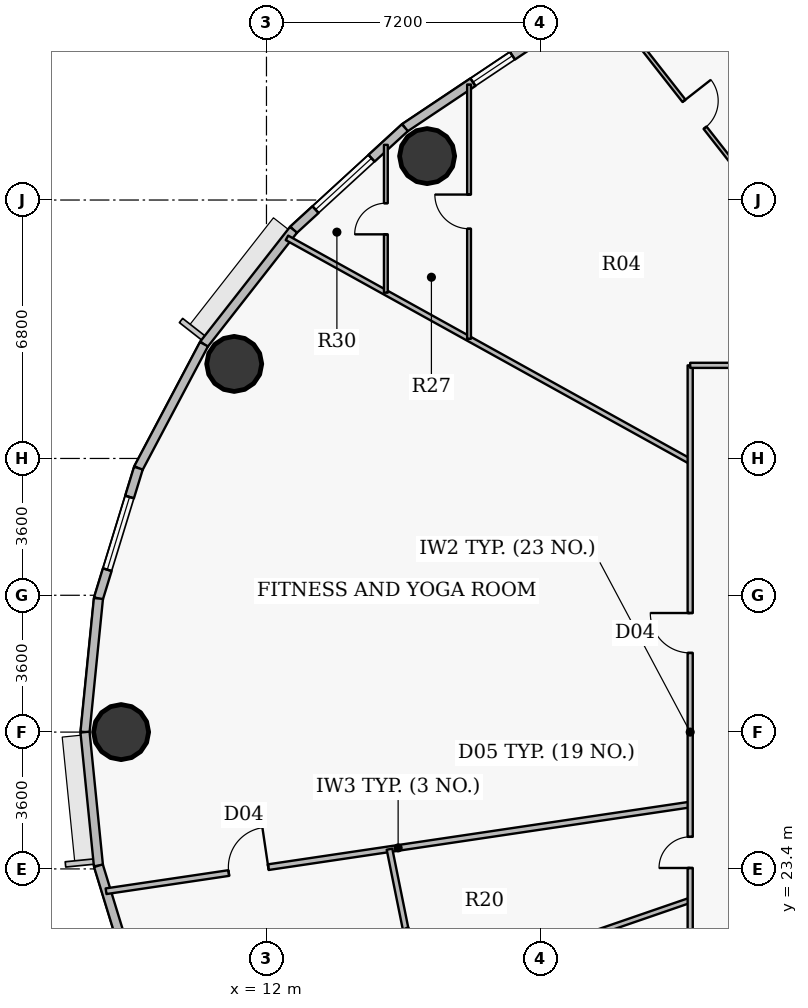
"""IFC4 building model, lengths in metres.
Left out: names, types, materials, properties, quantities, classifications, styles, units other than length and angle.
Written with IfcOpenShell. Run it as: python <this file> out.ifc"""

import sys

from ifc_helpers import new_model, si_unit, direction, frame, frame_2d, origin, origin_2d, place, context, subcontext, project, spatial, rectangle, hollow_circle, extrude, source, transform, mapped, element, fill, save


model = new_model("IFC4")
c1 = context("Model", 3, precision=1e-05, world=origin(), true_north=direction((0.0, 1.0)))
c2 = subcontext(c1, "Body", "Model", "MODEL_VIEW")
j1 = project(units=[si_unit("LENGTHUNIT", "METRE"), si_unit("PLANEANGLEUNIT", "RADIAN")], contexts=[c1])
p1 = place(None, origin())
s1 = spatial("IfcSite", under=j1, at=p1, CompositionType="ELEMENT")
p2 = place(p1, origin())
s2 = spatial("IfcBuilding", under=s1, at=p2, CompositionType="ELEMENT")
p3 = place(p2, frame((0.0, 0.0, 142.2)))
s3 = spatial("IfcBuildingStorey", under=s2, at=p3, CompositionType="ELEMENT", Elevation=142.2)
for number, where, z_axis, x_axis in (
    (1, (16.227, 42.156, 0.0), (0.0, 0.0, 1.0), (1.0, 0.0, 0.0)),
    (2, (11.151, 36.688, 0.0), (0.0, 0.0, 1.0), (1.0, 0.0, 0.0)),
    (3, (8.175, 27.0, 0.0), (0.0, 0.0, 1.0), (1.0, 0.0, 0.0)),
):
    element("IfcColumn", number, at=place(p3, frame(where, z_axis=z_axis, x_axis=x_axis)), inside=s3, PredefinedType="COLUMN", context=c2, shape_type="SweptSolid", body=[
        extrude(hollow_circle(Radius=0.725, WallThickness=0.042, at=origin_2d()), origin(), (0.0, 0.0, 1.0), 3.75),
    ])
p4 = place(p3, frame((15.642, 42.903, 0.0), z_axis=(0.0, 0.0, 1.0), x_axis=(0.831221811447, 0.555940914284, 0.0)))
e4 = element("IfcWall", 4, at=p4, inside=s3, PredefinedType="SOLIDWALL", context=c2, shape_type="SweptSolid", body=[
    extrude(rectangle(XDim=4.13, YDim=0.24, at=frame_2d((2.065, 0.0))), origin(), (0.0, 0.0, 1.0), 3.45),
])
p5 = place(p4, frame((2.156, 0.0, 0.9)))
e5 = element("IfcOpeningElement", 5, at=p5, cuts=e4, PredefinedType="OPENING", context=c2, shape_type="SweptSolid", body=[
    extrude(rectangle(XDim=1.25, YDim=1.65, at=origin_2d()), frame((0.625, 0.13, 0.825), z_axis=(0.0, -1.0, 0.0), x_axis=(1.0, 0.0, 0.0)), (0.0, 0.0, 1.0), 0.26),
])
p6 = place(p3, frame((12.711, 40.217, 0.0), z_axis=(0.0, 0.0, 1.0), x_axis=(0.737113356241, 0.675769117414, 0.0)))
e6 = element("IfcWall", 6, at=p6, inside=s3, PredefinedType="SOLIDWALL", context=c2, shape_type="SweptSolid", body=[
    extrude(rectangle(XDim=3.976, YDim=0.24, at=frame_2d((1.988, 0.0))), origin(), (0.0, 0.0, 1.0), 3.45),
])
p7 = place(p6, frame((0.787, 0.0, 0.9)))
e7 = element("IfcOpeningElement", 7, at=p7, cuts=e6, PredefinedType="OPENING", context=c2, shape_type="SweptSolid", body=[
    extrude(rectangle(XDim=2.0, YDim=1.75, at=origin_2d()), frame((1.0, 0.13, 0.875), z_axis=(0.0, -1.0, 0.0), x_axis=(1.0, 0.0, 0.0)), (0.0, 0.0, 1.0), 0.26),
])
p8 = place(p3, frame((10.355, 37.206, 0.0), z_axis=(0.0, 0.0, 1.0), x_axis=(0.616272103517, 0.787533297345, 0.0)))
e8 = element("IfcWall", 8, at=p8, inside=s3, PredefinedType="SOLIDWALL", context=c2, shape_type="SweptSolid", body=[
    extrude(rectangle(XDim=3.823, YDim=0.24, at=frame_2d((1.912, 0.0))), origin(), (0.0, 0.0, 1.0), 3.45),
])
p9 = place(p3, frame((8.63, 33.945, 0.0), z_axis=(0.0, 0.0, 1.0), x_axis=(0.467614004126, 0.883932770716, 0.0)))
e9 = element("IfcWall", 9, at=p9, inside=s3, PredefinedType="SOLIDWALL", context=c2, shape_type="SweptSolid", body=[
    extrude(rectangle(XDim=3.689, YDim=0.24, at=frame_2d((1.844, 0.0))), origin(), (0.0, 0.0, 1.0), 3.45),
])
p10 = place(p3, frame((7.578, 30.515, 0.0), z_axis=(0.0, 0.0, 1.0), x_axis=(0.293124431344, 0.956074300329, 0.0)))
e10 = element("IfcWall", 10, at=p10, inside=s3, PredefinedType="SOLIDWALL", context=c2, shape_type="SweptSolid", body=[
    extrude(rectangle(XDim=3.587, YDim=0.24, at=frame_2d((1.793, 0.0))), origin(), (0.0, 0.0, 1.0), 3.45),
])
p11 = place(p10, frame((0.794, 0.0, 0.9)))
e11 = element("IfcOpeningElement", 11, at=p11, cuts=e10, PredefinedType="OPENING", context=c2, shape_type="SweptSolid", body=[
    extrude(rectangle(XDim=2.0, YDim=1.75, at=origin_2d()), frame((1.0, 0.13, 0.875), z_axis=(0.0, -1.0, 0.0), x_axis=(1.0, 0.0, 0.0)), (0.0, 0.0, 1.0), 0.26),
])
for number, where, z_axis, x_axis in (
    (12, (7.225, 27.0, 0.0), (0.0, 0.0, 1.0), (0.1, 0.995, 0.0)),
    (13, (7.578, 23.485, 0.0), (0.0, 0.0, 1.0), (-0.1, 0.995, 0.0)),
):
    element("IfcWall", number, at=place(p3, frame(where, z_axis=z_axis, x_axis=x_axis)), inside=s3, PredefinedType="SOLIDWALL", context=c2, shape_type="SweptSolid", body=[
        extrude(rectangle(XDim=3.533, YDim=0.24, at=frame_2d((1.767, 0.0))), origin(), (0.0, 0.0, 1.0), 3.45),
    ])
p12 = place(p3, frame((8.63, 20.055, 0.0), z_axis=(0.0, 0.0, 1.0), x_axis=(-0.293124431344, 0.956074300329, 0.0)))
e14 = element("IfcWall", 14, at=p12, inside=s3, PredefinedType="SOLIDWALL", context=c2, shape_type="SweptSolid", body=[
    extrude(rectangle(XDim=3.587, YDim=0.24, at=frame_2d((1.793, 0.0))), origin(), (0.0, 0.0, 1.0), 3.45),
])
p13 = place(p3, frame((7.779, 22.812, 0.0), z_axis=(0.0, 0.0, 1.0), x_axis=(0.989169524168, 0.146777561148, 0.0)))
e15 = element("IfcWall", 15, at=p13, inside=s3, PredefinedType="PARTITIONING", context=c2, shape_type="SweptSolid", body=[
    extrude(rectangle(XDim=15.539, YDim=0.15, at=frame_2d((7.77, 0.0))), origin(), (0.0, 0.0, 1.0), 2.885),
])
p14 = place(p13, frame((3.265, 0.0, 0.0)))
e16 = element("IfcOpeningElement", 16, at=p14, cuts=e15, PredefinedType="OPENING", context=c2, shape_type="SweptSolid", body=[
    extrude(rectangle(XDim=1.05, YDim=2.15, at=origin_2d()), frame((0.525, 0.085, 1.075), z_axis=(0.0, -1.0, 0.0), x_axis=(1.0, 0.0, 0.0)), (0.0, 0.0, 1.0), 0.17),
])
p15 = place(p3, frame((9.735, 17.956, 0.0), z_axis=(0.0, 0.0, 1.0), x_axis=(0.945515704768, 0.325576491836, 0.0)))
e17 = element("IfcWall", 17, at=p15, inside=s3, PredefinedType="PARTITIONING", context=c2, shape_type="SweptSolid", body=[
    extrude(rectangle(XDim=14.188, YDim=0.135, at=frame_2d((7.094, 0.0))), origin(), (0.0, 0.0, 1.0), 2.885),
])
p16 = place(p3, frame((12.539, 40.005, 0.0), z_axis=(0.0, 0.0, 1.0), x_axis=(0.874619146564, -0.484810631549, 0.0)))
e18 = element("IfcWall", 18, at=p16, inside=s3, PredefinedType="PARTITIONING", context=c2, shape_type="SweptSolid", body=[
    extrude(rectangle(XDim=12.132, YDim=0.135, at=frame_2d((6.066, 0.0))), origin(), (0.0, 0.0, 1.0), 2.885),
])
p17 = place(p3, frame((15.142, 38.562, 0.0), z_axis=(0.0, 0.0, 1.0), x_axis=(0.0, 1.0, 0.0)))
e19 = element("IfcWall", 19, at=p17, inside=s3, PredefinedType="PARTITIONING", context=c2, shape_type="SweptSolid", body=[
    extrude(rectangle(XDim=3.89, YDim=0.1, at=frame_2d((1.945, 0.0))), origin(), (0.0, 0.0, 1.0), 2.885),
])
p18 = place(p17, frame((1.535, 0.0, 0.0)))
e20 = element("IfcOpeningElement", 20, at=p18, cuts=e19, PredefinedType="OPENING", context=c2, shape_type="SweptSolid", body=[
    extrude(rectangle(XDim=0.82, YDim=2.1, at=origin_2d()), frame((0.41, 0.06, 1.05), z_axis=(0.0, -1.0, 0.0), x_axis=(1.0, 0.0, 0.0)), (0.0, 0.0, 1.0), 0.12),
])
p19 = place(p3, frame((15.237, 23.919, 0.0), z_axis=(0.0, 0.0, 1.0), x_axis=(0.198269330309, -0.98014757698, 0.0)))
e21 = element("IfcWall", 21, at=p19, inside=s3, PredefinedType="PARTITIONING", context=c2, shape_type="SweptSolid", body=[
    extrude(rectangle(XDim=2.136, YDim=0.15, at=frame_2d((1.068, 0.0))), origin(), (0.0, 0.0, 1.0), 2.885),
])
p20 = place(p3, frame((15.661, 21.825, 0.0), z_axis=(0.0, 0.0, 1.0), x_axis=(0.54543603077, -0.838152454114, 0.0)))
e22 = element("IfcWall", 22, at=p20, inside=s3, PredefinedType="PARTITIONING", context=c2, shape_type="SweptSolid", body=[
    extrude(rectangle(XDim=1.782, YDim=0.15, at=frame_2d((0.891, 0.0))), origin(), (0.0, 0.0, 1.0), 2.885),
])
p21 = place(p3, frame((17.331, 37.348, 0.0), z_axis=(0.0, 0.0, 1.0), x_axis=(0.0, 1.0, 0.0)))
e23 = element("IfcWall", 23, at=p21, inside=s3, PredefinedType="PARTITIONING", context=c2, shape_type="SweptSolid", body=[
    extrude(rectangle(XDim=6.691, YDim=0.1, at=frame_2d((3.345, 0.0))), origin(), (0.0, 0.0, 1.0), 2.885),
])
p22 = place(p21, frame((2.895, 0.0, 0.0)))
e24 = element("IfcOpeningElement", 24, at=p22, cuts=e23, PredefinedType="OPENING", context=c2, shape_type="SweptSolid", body=[
    extrude(rectangle(XDim=0.9, YDim=2.1, at=origin_2d()), frame((0.45, 0.06, 1.05), z_axis=(0.0, -1.0, 0.0), x_axis=(1.0, 0.0, 0.0)), (0.0, 0.0, 1.0), 0.12),
])
p23 = place(p3, frame((21.01, 46.133, 0.0), z_axis=(0.0, 0.0, 1.0), x_axis=(0.616738538538, -0.787168072956, 0.0)))
e25 = element("IfcWall", 25, at=p23, inside=s3, PredefinedType="PARTITIONING", context=c2, shape_type="SweptSolid", body=[
    extrude(rectangle(XDim=7.312, YDim=0.1, at=frame_2d((3.656, 0.0))), origin(), (0.0, 0.0, 1.0), 2.885),
])
p24 = place(p23, frame((3.206, 0.0, 0.0)))
e26 = element("IfcOpeningElement", 26, at=p24, cuts=e25, PredefinedType="OPENING", context=c2, shape_type="SweptSolid", body=[
    extrude(rectangle(XDim=0.9, YDim=2.1, at=origin_2d()), frame((0.45, 0.06, 1.05), z_axis=(0.0, -1.0, 0.0), x_axis=(1.0, 0.0, 0.0)), (0.0, 0.0, 1.0), 0.12),
])
p25 = place(p3, frame((23.15, 17.35, 0.0), z_axis=(0.0, 0.0, 1.0), x_axis=(0.0, 1.0, 0.0)))
e27 = element("IfcWall", 27, at=p25, inside=s3, PredefinedType="PARTITIONING", context=c2, shape_type="SweptSolid", body=[
    extrude(rectangle(XDim=19.3, YDim=0.135, at=frame_2d((9.65, 0.0))), origin(), (0.0, 0.0, 1.0), 2.885),
])
p26 = place(p25, frame((11.733, 0.0, 0.0)))
e28 = element("IfcOpeningElement", 28, at=p26, cuts=e27, PredefinedType="OPENING", context=c2, shape_type="SweptSolid", body=[
    extrude(rectangle(XDim=1.05, YDim=2.15, at=origin_2d()), frame((0.525, 0.078, 1.075), z_axis=(0.0, -1.0, 0.0), x_axis=(1.0, 0.0, 0.0)), (0.0, 0.0, 1.0), 0.155),
])
p27 = place(p25, frame((6.074, 0.0, 0.0)))
e29 = element("IfcOpeningElement", 29, at=p27, cuts=e27, PredefinedType="OPENING", context=c2, shape_type="SweptSolid", body=[
    extrude(rectangle(XDim=0.82, YDim=2.1, at=origin_2d()), frame((0.41, 0.078, 1.05), z_axis=(0.0, -1.0, 0.0), x_axis=(1.0, 0.0, 0.0)), (0.0, 0.0, 1.0), 0.155),
])
p28 = place(p3, frame((23.15, 36.65, 0.0), z_axis=(0.0, 0.0, 1.0), x_axis=(1.0, 0.0, 0.0)))
e30 = element("IfcWall", 30, at=p28, inside=s3, PredefinedType="PARTITIONING", context=c2, shape_type="SweptSolid", body=[
    extrude(rectangle(XDim=10.236, YDim=0.135, at=frame_2d((5.118, 0.0))), origin(), (0.0, 0.0, 1.0), 2.885),
])
p29 = place(p28, frame((4.618, 0.0, 0.0)))
e31 = element("IfcOpeningElement", 31, at=p29, cuts=e30, PredefinedType="OPENING", context=c2, shape_type="SweptSolid", body=[
    extrude(rectangle(XDim=1.0, YDim=2.15, at=origin_2d()), frame((0.5, 0.078, 1.075), z_axis=(0.0, -1.0, 0.0), x_axis=(1.0, 0.0, 0.0)), (0.0, 0.0, 1.0), 0.155),
])
m1 = source(origin(), c2, "Body", "SweptSolid", [
    extrude(rectangle(XDim=2.0, YDim=1.75, at=origin_2d()), frame((1.0, 0.03, 0.875), z_axis=(0.0, -1.0, 0.0), x_axis=(1.0, 0.0, 0.0)), (0.0, 0.0, 1.0), 0.06),
])
p30 = place(p7, origin())
e32 = element("IfcWindow", 32, at=p30, inside=s3, PartitioningType="DOUBLE_PANEL_VERTICAL", PredefinedType="WINDOW", context=c2, shape_type="MappedRepresentation", body=[
    mapped(m1, transform((0.0, 0.0, 0.0), x_axis=(1.0, 0.0, 0.0), y_axis=(0.0, 1.0, 0.0), z_axis=(0.0, 0.0, 1.0), scale=1.0)),
])
fill(e7, e32)
p31 = place(p11, origin())
e33 = element("IfcWindow", 33, at=p31, inside=s3, PartitioningType="DOUBLE_PANEL_VERTICAL", PredefinedType="WINDOW", context=c2, shape_type="MappedRepresentation", body=[
    mapped(m1, transform((0.0, 0.0, 0.0), x_axis=(1.0, 0.0, 0.0), y_axis=(0.0, 1.0, 0.0), z_axis=(0.0, 0.0, 1.0), scale=1.0)),
])
fill(e11, e33)
m2 = source(origin(), c2, "Body", "SweptSolid", [
    extrude(rectangle(XDim=1.25, YDim=1.65, at=origin_2d()), frame((0.625, 0.03, 0.825), z_axis=(0.0, -1.0, 0.0), x_axis=(1.0, 0.0, 0.0)), (0.0, 0.0, 1.0), 0.06),
])
p32 = place(p5, origin())
e34 = element("IfcWindow", 34, at=p32, inside=s3, PartitioningType="SINGLE_PANEL", PredefinedType="WINDOW", context=c2, shape_type="MappedRepresentation", body=[
    mapped(m2, transform((0.0, 0.0, 0.0), x_axis=(1.0, 0.0, 0.0), y_axis=(0.0, 1.0, 0.0), z_axis=(0.0, 0.0, 1.0), scale=1.0)),
])
fill(e5, e34)
m3 = source(origin(), c2, "Body", "SweptSolid", [
    extrude(rectangle(XDim=0.9, YDim=2.1, at=origin_2d()), frame((0.45, 0.025, 1.05), z_axis=(0.0, -1.0, 0.0), x_axis=(1.0, 0.0, 0.0)), (0.0, 0.0, 1.0), 0.05),
])
p33 = place(p24, origin())
e35 = element("IfcDoor", 35, at=p33, inside=s3, OperationType="SINGLE_SWING_LEFT", PredefinedType="DOOR", context=c2, shape_type="MappedRepresentation", body=[
    mapped(m3, transform((0.0, 0.0, 0.0), x_axis=(1.0, 0.0, 0.0), y_axis=(0.0, 1.0, 0.0), z_axis=(0.0, 0.0, 1.0), scale=1.0)),
])
fill(e26, e35)
p34 = place(p22, origin())
e36 = element("IfcDoor", 36, at=p34, inside=s3, OperationType="SINGLE_SWING_RIGHT", PredefinedType="DOOR", context=c2, shape_type="MappedRepresentation", body=[
    mapped(m3, transform((0.0, 0.0, 0.0), x_axis=(1.0, 0.0, 0.0), y_axis=(0.0, 1.0, 0.0), z_axis=(0.0, 0.0, 1.0), scale=1.0)),
])
fill(e24, e36)
m4 = source(origin(), c2, "Body", "SweptSolid", [
    extrude(rectangle(XDim=0.82, YDim=2.1, at=origin_2d()), frame((0.41, 0.025, 1.05), z_axis=(0.0, -1.0, 0.0), x_axis=(1.0, 0.0, 0.0)), (0.0, 0.0, 1.0), 0.05),
])
p35 = place(p18, origin())
e37 = element("IfcDoor", 37, at=p35, inside=s3, OperationType="SINGLE_SWING_LEFT", PredefinedType="DOOR", context=c2, shape_type="MappedRepresentation", body=[
    mapped(m4, transform((0.0, 0.0, 0.0), x_axis=(1.0, 0.0, 0.0), y_axis=(0.0, 1.0, 0.0), z_axis=(0.0, 0.0, 1.0), scale=1.0)),
])
fill(e20, e37)
m5 = source(origin(), c2, "Body", "SweptSolid", [
    extrude(rectangle(XDim=1.05, YDim=2.15, at=origin_2d()), frame((0.525, 0.025, 1.075), z_axis=(0.0, -1.0, 0.0), x_axis=(1.0, 0.0, 0.0)), (0.0, 0.0, 1.0), 0.05),
])
p36 = place(p26, origin())
e38 = element("IfcDoor", 38, at=p36, inside=s3, OperationType="SINGLE_SWING_RIGHT", PredefinedType="DOOR", context=c2, shape_type="MappedRepresentation", body=[
    mapped(m5, transform((0.0, 0.0, 0.0), x_axis=(1.0, 0.0, 0.0), y_axis=(0.0, 1.0, 0.0), z_axis=(0.0, 0.0, 1.0), scale=1.0)),
])
fill(e28, e38)
p37 = place(p27, origin())
e39 = element("IfcDoor", 39, at=p37, inside=s3, OperationType="SINGLE_SWING_LEFT", PredefinedType="DOOR", context=c2, shape_type="MappedRepresentation", body=[
    mapped(m4, transform((0.0, 0.0, 0.0), x_axis=(1.0, 0.0, 0.0), y_axis=(0.0, 1.0, 0.0), z_axis=(0.0, 0.0, 1.0), scale=1.0)),
])
fill(e29, e39)
p38 = place(p14, origin())
e40 = element("IfcDoor", 40, at=p38, inside=s3, OperationType="SINGLE_SWING_RIGHT", PredefinedType="DOOR", context=c2, shape_type="MappedRepresentation", body=[
    mapped(m5, transform((0.0, 0.0, 0.0), x_axis=(1.0, 0.0, 0.0), y_axis=(0.0, 1.0, 0.0), z_axis=(0.0, 0.0, 1.0), scale=1.0)),
])
fill(e16, e40)
save(model, sys.argv[1])
